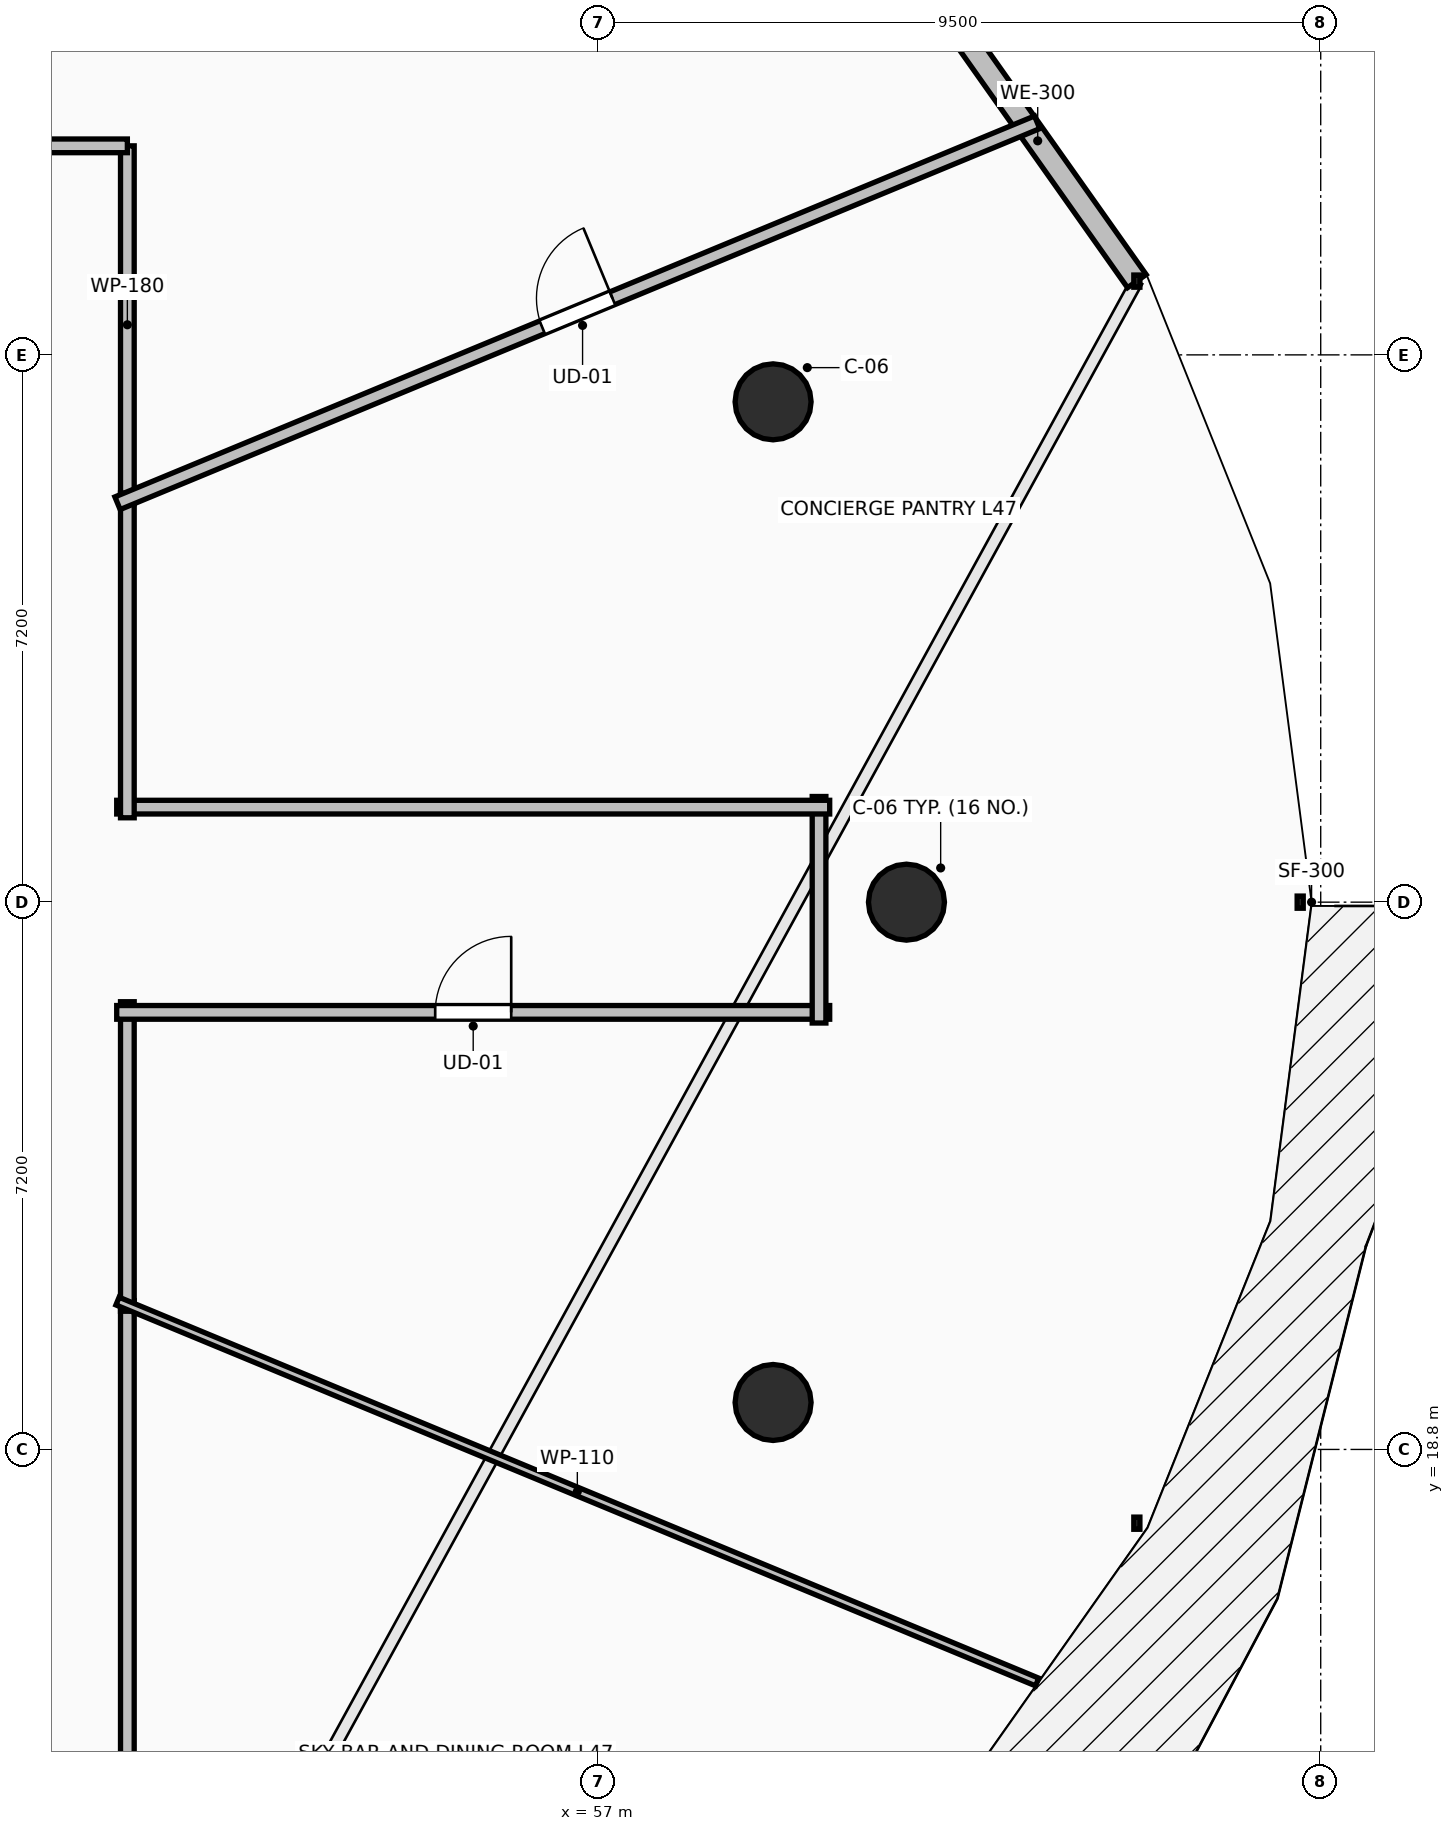
"""IFC4 building model, lengths in metres.
Left out: names, types, materials, properties, quantities, classifications, styles, units other than length and angle.
Written with IfcOpenShell. Run it as: python <this file> out.ifc"""

import sys

from ifc_helpers import new_model, si_unit, direction, frame, frame_2d, origin, origin_2d, place, context, subcontext, project, spatial, rectangle, circle, extrude, element, fill, save


model = new_model("IFC4")
c1 = context("Model", 3, precision=1e-05, world=origin(), true_north=direction((0.0, 1.0)))
c2 = subcontext(c1, "Body", "Model", "MODEL_VIEW")
j1 = project(units=[si_unit("LENGTHUNIT", "METRE"), si_unit("PLANEANGLEUNIT", "RADIAN")], contexts=[c1])
p1 = place(None, origin())
s1 = spatial("IfcSite", under=j1, at=p1, CompositionType="ELEMENT")
p2 = place(p1, origin())
s2 = spatial("IfcBuilding", under=s1, at=p2, CompositionType="ELEMENT")
p3 = place(p2, frame((0.0, 0.0, 174.6)))
s3 = spatial("IfcBuildingStorey", under=s2, at=p3, CompositionType="ELEMENT", Elevation=174.6)
for number, where, z_axis, x_axis in (
    (1, (61.05, 26.0, 0.0), (0.0, 0.0, 1.0), (1.0, 0.0, 0.0)),
    (2, (59.295, 32.582, 0.0), (0.0, 0.0, 1.0), (0.924, 0.383, 0.0)),
    (3, (59.295, 19.418, 0.0), (0.0, 0.0, 1.0), (0.924, -0.383, 0.0)),
):
    element("IfcColumn", number, at=place(p3, frame(where, z_axis=z_axis, x_axis=x_axis)), inside=s3, PredefinedType="COLUMN", context=c2, shape_type="SweptSolid", body=[
        extrude(circle(Radius=0.5, at=origin_2d()), origin(), (0.0, 0.0, 1.0), 4.5),
    ])
p4 = place(p3, frame((64.081, 34.17, 0.0), z_axis=(0.0, 0.0, 1.0), x_axis=(-0.577168747264, 0.81662490605, 0.0)))
e4 = element("IfcWall", 4, at=p4, inside=s3, PredefinedType="STANDARD", context=c2, shape_type="SweptSolid", body=[
    extrude(rectangle(XDim=4.52, YDim=0.3, at=frame_2d((2.26, 0.0))), origin(), (0.0, 0.0, 1.0), 4.24),
])
p5 = place(p3, frame((50.8, 31.242, 0.0), z_axis=(0.0, 0.0, 1.0), x_axis=(0.0, 1.0, 0.0)))
e5 = element("IfcWall", 5, at=p5, inside=s3, PredefinedType="PARTITIONING", context=c2, shape_type="SweptSolid", body=[
    extrude(rectangle(XDim=4.708, YDim=0.18, at=frame_2d((2.354, 0.0))), origin(), (0.0, 0.0, 1.0), 3.432),
])
p6 = place(p3, frame((50.8, 35.95, 0.0), z_axis=(0.0, 0.0, 1.0), x_axis=(-1.0, 0.0, 0.0)))
e6 = element("IfcWall", 6, at=p6, inside=s3, PredefinedType="PARTITIONING", context=c2, shape_type="SweptSolid", body=[
    extrude(rectangle(XDim=12.86, YDim=0.18, at=frame_2d((6.43, 0.0))), origin(), (0.0, 0.0, 1.0), 3.432),
])
p7 = place(p6, frame((5.83, 0.0, 0.0)))
e7 = element("IfcOpeningElement", 7, at=p7, cuts=e6, PredefinedType="OPENING", context=c2, shape_type="SweptSolid", body=[
    extrude(rectangle(XDim=1.2, YDim=2.15, at=frame_2d((0.6, 1.075))), frame((0.0, 0.105, 0.0), z_axis=(0.0, -1.0, 0.0), x_axis=(1.0, 0.0, 0.0)), (0.0, 0.0, 1.0), 0.21),
])
p8 = place(p3, frame((50.8, 14.05, 0.0), z_axis=(0.0, 0.0, 1.0), x_axis=(0.0, 1.0, 0.0)))
e8 = element("IfcWall", 8, at=p8, inside=s3, PredefinedType="PARTITIONING", context=c2, shape_type="SweptSolid", body=[
    extrude(rectangle(XDim=6.708, YDim=0.18, at=frame_2d((3.354, 0.0))), origin(), (0.0, 0.0, 1.0), 3.432),
])
p9 = place(p3, frame((50.8, 20.618, 0.0), z_axis=(0.0, 0.0, 1.0), x_axis=(0.0, 1.0, 0.0)))
e9 = element("IfcWall", 9, at=p9, inside=s3, PredefinedType="PARTITIONING", context=c2, shape_type="SweptSolid", body=[
    extrude(rectangle(XDim=4.072, YDim=0.18, at=frame_2d((2.036, 0.0))), origin(), (0.0, 0.0, 1.0), 4.24),
])
p10 = place(p3, frame((50.66, 24.55, 0.0), z_axis=(0.0, 0.0, 1.0), x_axis=(1.0, 0.0, 0.0)))
e10 = element("IfcWall", 10, at=p10, inside=s3, PredefinedType="PARTITIONING", context=c2, shape_type="SweptSolid", body=[
    extrude(rectangle(XDim=9.38, YDim=0.18, at=frame_2d((4.69, 0.0))), origin(), (0.0, 0.0, 1.0), 3.432),
])
p11 = place(p10, frame((4.19, 0.0, 0.0)))
e11 = element("IfcOpeningElement", 11, at=p11, cuts=e10, PredefinedType="OPENING", context=c2, shape_type="SweptSolid", body=[
    extrude(rectangle(XDim=1.0, YDim=2.15, at=frame_2d((0.5, 1.075))), frame((0.0, 0.105, 0.0), z_axis=(0.0, -1.0, 0.0), x_axis=(1.0, 0.0, 0.0)), (0.0, 0.0, 1.0), 0.21),
])
p12 = place(p3, frame((59.9, 24.41, 0.0), z_axis=(0.0, 0.0, 1.0), x_axis=(0.0, 1.0, 0.0)))
e12 = element("IfcWall", 12, at=p12, inside=s3, PredefinedType="PARTITIONING", context=c2, shape_type="SweptSolid", body=[
    extrude(rectangle(XDim=2.98, YDim=0.18, at=frame_2d((1.49, 0.0))), origin(), (0.0, 0.0, 1.0), 3.432),
])
p13 = place(p3, frame((60.04, 27.25, 0.0), z_axis=(0.0, 0.0, 1.0), x_axis=(-1.0, 0.0, 0.0)))
e13 = element("IfcWall", 13, at=p13, inside=s3, PredefinedType="PARTITIONING", context=c2, shape_type="SweptSolid", body=[
    extrude(rectangle(XDim=9.38, YDim=0.18, at=frame_2d((4.69, 0.0))), origin(), (0.0, 0.0, 1.0), 3.432),
])
p14 = place(p3, frame((50.8, 27.11, 0.0), z_axis=(0.0, 0.0, 1.0), x_axis=(0.0, 1.0, 0.0)))
e14 = element("IfcWall", 14, at=p14, inside=s3, PredefinedType="PARTITIONING", context=c2, shape_type="SweptSolid", body=[
    extrude(rectangle(XDim=4.272, YDim=0.18, at=frame_2d((2.136, 0.0))), origin(), (0.0, 0.0, 1.0), 3.432),
])
p15 = place(p3, frame((50.671, 31.248, 0.0), z_axis=(0.0, 0.0, 1.0), x_axis=(0.923884589978, 0.382671222332, 0.0)))
e15 = element("IfcWall", 15, at=p15, inside=s3, PredefinedType="PARTITIONING", context=c2, shape_type="SweptSolid", body=[
    extrude(rectangle(XDim=13.095, YDim=0.18, at=frame_2d((6.548, 0.0))), origin(), (0.0, 0.0, 1.0), 3.432),
])
p16 = place(p15, frame((6.048, 0.0, 0.0)))
e16 = element("IfcOpeningElement", 16, at=p16, cuts=e15, PredefinedType="OPENING", context=c2, shape_type="SweptSolid", body=[
    extrude(rectangle(XDim=1.0, YDim=2.15, at=frame_2d((0.5, 1.075))), frame((0.0, 0.105, 0.0), z_axis=(0.0, -1.0, 0.0), x_axis=(1.0, 0.0, 0.0)), (0.0, 0.0, 1.0), 0.21),
])
p17 = place(p3, frame((62.769, 15.74, 0.0), z_axis=(0.0, 0.0, 1.0), x_axis=(-0.923884589978, 0.382671222332, 0.0)))
e17 = element("IfcWall", 17, at=p17, inside=s3, PredefinedType="PARTITIONING", context=c2, shape_type="SweptSolid", body=[
    extrude(rectangle(XDim=13.095, YDim=0.11, at=frame_2d((6.548, 0.0))), origin(), (0.0, 0.0, 1.0), 3.728),
])
p18 = place(p11, origin())
e18 = element("IfcDoor", 18, at=p18, inside=s3, OperationType="SINGLE_SWING_RIGHT", PredefinedType="DOOR", context=c2, shape_type="SweptSolid", body=[
    extrude(rectangle(XDim=1.0, YDim=2.15, at=frame_2d((0.5, 1.075))), frame((0.0, 0.025, 0.0), z_axis=(0.0, -1.0, 0.0), x_axis=(1.0, 0.0, 0.0)), (0.0, 0.0, 1.0), 0.05),
])
fill(e11, e18)
p19 = place(p16, origin())
e19 = element("IfcDoor", 19, at=p19, inside=s3, OperationType="SINGLE_SWING_RIGHT", PredefinedType="DOOR", context=c2, shape_type="SweptSolid", body=[
    extrude(rectangle(XDim=1.0, YDim=2.15, at=frame_2d((0.5, 1.075))), frame((0.0, 0.025, 0.0), z_axis=(0.0, -1.0, 0.0), x_axis=(1.0, 0.0, 0.0)), (0.0, 0.0, 1.0), 0.05),
])
fill(e16, e19)
save(model, sys.argv[1])
